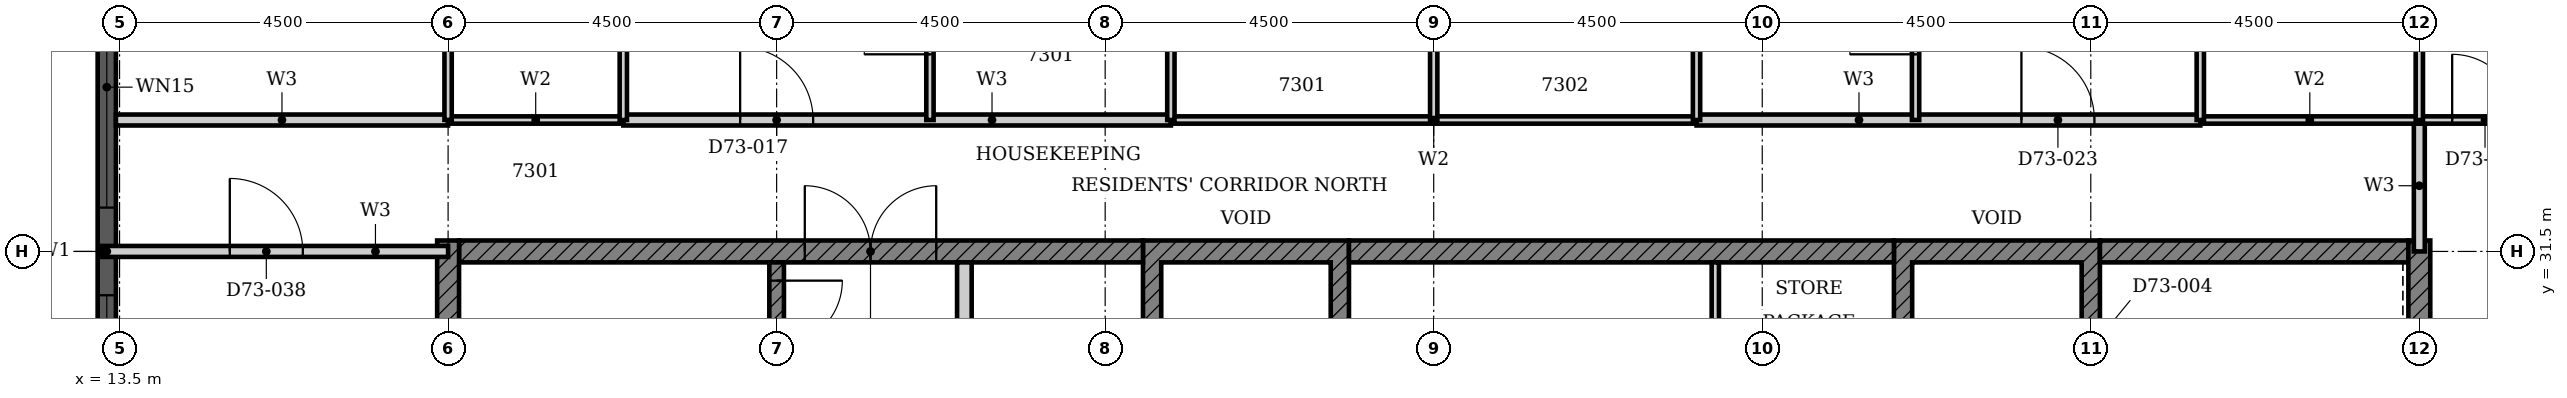
"""IFC4 building model, lengths in metres.
Left out: names, types, materials, properties, quantities, classifications, styles, units other than length and angle.
Written with IfcOpenShell. Run it as: python <this file> out.ifc"""

import sys

from ifc_helpers import new_model, si_unit, direction, frame, frame_2d, origin, place, context, subcontext, project, spatial, polyline, rectangle, outline, extrude, element, fill, save


model = new_model("IFC4")
c1 = context("Model", 3, precision=1e-05, world=origin(), true_north=direction((0.0, 1.0)))
c2 = subcontext(c1, "Body", "Model", "MODEL_VIEW")
j1 = project(units=[si_unit("LENGTHUNIT", "METRE"), si_unit("PLANEANGLEUNIT", "RADIAN")], contexts=[c1])
p1 = place(None, origin())
s1 = spatial("IfcSite", under=j1, at=p1, CompositionType="ELEMENT")
p2 = place(p1, origin())
s2 = spatial("IfcBuilding", under=s1, at=p2, CompositionType="ELEMENT")
p3 = place(p2, frame((0.0, 0.0, 287.1)))
s3 = spatial("IfcBuildingStorey", under=s2, at=p3, CompositionType="ELEMENT", Elevation=287.1)
p4 = place(p3, frame((13.325, 35.7, 0.0), z_axis=(0.0, 0.0, 1.0), x_axis=(0.0, -1.0, 0.0)))
e1 = element("IfcWall", 1, at=p4, inside=s3, PredefinedType="SOLIDWALL", context=c2, shape_type="SweptSolid", body=[
    extrude(rectangle(XDim=8.4, YDim=0.25, at=frame_2d((4.2, 0.0))), origin(), (0.0, 0.0, 1.0), 3.7),
])
p5 = place(p4, frame((0.3, 0.0, 0.45)))
e2 = element("IfcOpeningElement", 2, at=p5, cuts=e1, PredefinedType="OPENING", context=c2, shape_type="SweptSolid", body=[
    extrude(rectangle(XDim=3.3, YDim=2.3, at=frame_2d((1.65, 1.15))), frame((0.0, 0.135, 0.0), z_axis=(0.0, -1.0, 0.0), x_axis=(1.0, 0.0, 0.0)), (0.0, 0.0, 1.0), 0.27),
])
p6 = place(p4, frame((4.8, 0.0, 0.45)))
e3 = element("IfcOpeningElement", 3, at=p6, cuts=e1, PredefinedType="OPENING", context=c2, shape_type="SweptSolid", body=[
    extrude(rectangle(XDim=3.3, YDim=2.3, at=frame_2d((1.65, 1.15))), frame((0.0, 0.135, 0.0), z_axis=(0.0, -1.0, 0.0), x_axis=(1.0, 0.0, 0.0)), (0.0, 0.0, 1.0), 0.27),
])
p7 = place(p3, origin())
e4 = element("IfcWall", 4, at=p7, inside=s3, PredefinedType="SHEAR", context=c2, shape_type="SweptSolid", body=[
    extrude(outline(polyline([(27.518, 28.725), (27.768, 28.725), (27.768, 31.35), (30.089, 31.35), (30.089, 28.725), (30.339, 28.725), (30.339, 31.65), (27.518, 31.65), (27.518, 28.725)])), origin(), (0.0, 0.0, 1.0), 3.4),
])
p8 = place(p3, origin())
e5 = element("IfcWall", 5, at=p8, inside=s3, PredefinedType="SHEAR", context=c2, shape_type="SweptSolid", body=[
    extrude(outline(polyline([(37.803, 28.725), (38.053, 28.725), (38.053, 31.35), (40.375, 31.35), (40.375, 28.725), (40.625, 28.725), (40.625, 31.65), (37.803, 31.65), (37.803, 28.725)])), origin(), (0.0, 0.0, 1.0), 3.4),
])
p9 = place(p3, frame((18.15, 31.5, 0.0), z_axis=(0.0, 0.0, 1.0), x_axis=(1.0, 0.0, 0.0)))
e6 = element("IfcWall", 6, at=p9, inside=s3, PredefinedType="SHEAR", context=c2, shape_type="SweptSolid", body=[
    extrude(rectangle(XDim=9.368, YDim=0.3, at=frame_2d((4.684, 0.0))), origin(), (0.0, 0.0, 1.0), 3.4),
])
p10 = place(p9, frame((4.736, 0.0, 0.0)))
e7 = element("IfcOpeningElement", 7, at=p10, cuts=e6, PredefinedType="OPENING", context=c2, shape_type="SweptSolid", body=[
    extrude(rectangle(XDim=1.8, YDim=2.1, at=frame_2d((0.9, 1.05))), frame((0.0, 0.16, 0.0), z_axis=(0.0, -1.0, 0.0), x_axis=(1.0, 0.0, 0.0)), (0.0, 0.0, 1.0), 0.32),
])
p11 = place(p3, frame((30.339, 31.5, 0.0), z_axis=(0.0, 0.0, 1.0), x_axis=(1.0, 0.0, 0.0)))
e8 = element("IfcWall", 8, at=p11, inside=s3, PredefinedType="SHEAR", context=c2, shape_type="SweptSolid", body=[
    extrude(rectangle(XDim=7.464, YDim=0.3, at=frame_2d((3.732, 0.0))), origin(), (0.0, 0.0, 1.0), 3.4),
])
p12 = place(p3, frame((40.625, 31.5, 0.0), z_axis=(0.0, 0.0, 1.0), x_axis=(1.0, 0.0, 0.0)))
e9 = element("IfcWall", 9, at=p12, inside=s3, PredefinedType="SHEAR", context=c2, shape_type="SweptSolid", body=[
    extrude(rectangle(XDim=4.225, YDim=0.3, at=frame_2d((2.113, 0.0))), origin(), (0.0, 0.0, 1.0), 3.4),
])
for number, where, z_axis, x_axis in (
    (10, (18.0, 22.35, 0.0), (0.0, 0.0, 1.0), (0.0, 1.0, 0.0)),
    (11, (45.0, 22.35, 0.0), (0.0, 0.0, 1.0), (0.0, 1.0, 0.0)),
):
    element("IfcWall", number, at=place(p3, frame(where, z_axis=z_axis, x_axis=x_axis)), inside=s3, PredefinedType="SHEAR", context=c2, shape_type="SweptSolid", body=[
        extrude(rectangle(XDim=9.3, YDim=0.3, at=frame_2d((4.65, 0.0))), origin(), (0.0, 0.0, 1.0), 3.4),
    ])
p13 = place(p3, frame((25.072, 28.725, 0.0), z_axis=(0.0, 0.0, 1.0), x_axis=(0.0, 1.0, 0.0)))
e12 = element("IfcWall", 12, at=p13, inside=s3, PredefinedType="PARTITIONING", context=c2, shape_type="SweptSolid", body=[
    extrude(rectangle(XDim=2.625, YDim=0.2, at=frame_2d((1.312, 0.0))), origin(), (0.0, 0.0, 1.0), 3.4),
])
p14 = place(p3, frame((35.357, 28.725, 0.0), z_axis=(0.0, 0.0, 1.0), x_axis=(0.0, 1.0, 0.0)))
e13 = element("IfcWall", 13, at=p14, inside=s3, PredefinedType="PARTITIONING", context=c2, shape_type="SweptSolid", body=[
    extrude(rectangle(XDim=2.625, YDim=0.1, at=frame_2d((1.312, 0.0))), origin(), (0.0, 0.0, 1.0), 3.4),
])
p15 = place(p3, frame((22.5, 31.35, 0.0), z_axis=(0.0, 0.0, 1.0), x_axis=(0.0, -1.0, 0.0)))
e14 = element("IfcWall", 14, at=p15, inside=s3, PredefinedType="SHEAR", context=c2, shape_type="SweptSolid", body=[
    extrude(rectangle(XDim=5.825, YDim=0.2, at=frame_2d((2.913, 0.0))), origin(), (0.0, 0.0, 1.0), 3.4),
])
p16 = place(p15, frame((0.25, 0.0, 0.0)))
e15 = element("IfcOpeningElement", 15, at=p16, cuts=e14, PredefinedType="OPENING", context=c2, shape_type="SweptSolid", body=[
    extrude(rectangle(XDim=1.8, YDim=2.1, at=frame_2d((0.9, 1.05))), frame((0.0, 0.11, 0.0), z_axis=(0.0, -1.0, 0.0), x_axis=(1.0, 0.0, 0.0)), (0.0, 0.0, 1.0), 0.22),
])
p17 = place(p3, frame((13.26, 31.5, 0.0), z_axis=(0.0, 0.0, 1.0), x_axis=(1.0, 0.0, 0.0)))
e16 = element("IfcWall", 16, at=p17, inside=s3, PredefinedType="PARTITIONING", context=c2, shape_type="SweptSolid", body=[
    extrude(rectangle(XDim=4.74, YDim=0.15, at=frame_2d((2.37, 0.0))), origin(), (0.0, 0.0, 1.0), 3.4),
])
p18 = place(p17, frame((1.75, 0.0, 0.0)))
e17 = element("IfcOpeningElement", 17, at=p18, cuts=e16, PredefinedType="OPENING", context=c2, shape_type="SweptSolid", body=[
    extrude(rectangle(XDim=1.0, YDim=2.2, at=frame_2d((0.5, 1.1))), frame((0.0, 0.085, 0.0), z_axis=(0.0, -1.0, 0.0), x_axis=(1.0, 0.0, 0.0)), (0.0, 0.0, 1.0), 0.17),
])
p19 = place(p3, frame((13.45, 33.3, 0.0), z_axis=(0.0, 0.0, 1.0), x_axis=(1.0, 0.0, 0.0)))
e18 = element("IfcWall", 18, at=p19, inside=s3, PredefinedType="PARTITIONING", context=c2, shape_type="SweptSolid", body=[
    extrude(rectangle(XDim=4.549, YDim=0.15, at=frame_2d((2.274, 0.0))), origin(), (0.0, 0.0, 1.0), 3.4),
])
p20 = place(p3, frame((20.4, 33.3, 0.0), z_axis=(0.0, 0.0, 1.0), x_axis=(1.0, 0.0, 0.0)))
e19 = element("IfcWall", 19, at=p20, inside=s3, PredefinedType="PARTITIONING", context=c2, shape_type="SweptSolid", body=[
    extrude(rectangle(XDim=7.5, YDim=0.15, at=frame_2d((3.75, 0.0))), origin(), (0.0, 0.0, 1.0), 3.4),
])
p21 = place(p20, frame((1.6, 0.0, 0.0)))
e20 = element("IfcOpeningElement", 20, at=p21, cuts=e19, PredefinedType="OPENING", context=c2, shape_type="SweptSolid", body=[
    extrude(rectangle(XDim=1.0, YDim=2.2, at=frame_2d((0.5, 1.1))), frame((0.0, 0.085, 0.0), z_axis=(0.0, -1.0, 0.0), x_axis=(1.0, 0.0, 0.0)), (0.0, 0.0, 1.0), 0.17),
])
p22 = place(p3, frame((35.1, 33.3, 0.0), z_axis=(0.0, 0.0, 1.0), x_axis=(1.0, 0.0, 0.0)))
e21 = element("IfcWall", 21, at=p22, inside=s3, PredefinedType="PARTITIONING", context=c2, shape_type="SweptSolid", body=[
    extrude(rectangle(XDim=6.9, YDim=0.15, at=frame_2d((3.45, 0.0))), origin(), (0.0, 0.0, 1.0), 3.4),
])
p23 = place(p22, frame((4.45, 0.0, 0.0)))
e22 = element("IfcOpeningElement", 22, at=p23, cuts=e21, PredefinedType="OPENING", context=c2, shape_type="SweptSolid", body=[
    extrude(rectangle(XDim=1.0, YDim=2.2, at=frame_2d((0.5, 1.1))), frame((0.0, 0.085, 0.0), z_axis=(0.0, -1.0, 0.0), x_axis=(1.0, 0.0, 0.0)), (0.0, 0.0, 1.0), 0.17),
])
p24 = place(p3, frame((45.0, 31.5, 0.0), z_axis=(0.0, 0.0, 1.0), x_axis=(0.0, 1.0, 0.0)))
e23 = element("IfcWall", 23, at=p24, inside=s3, PredefinedType="PARTITIONING", context=c2, shape_type="SweptSolid", body=[
    extrude(rectangle(XDim=1.8, YDim=0.15, at=frame_2d((0.9, 0.0))), origin(), (0.0, 0.0, 1.0), 3.4),
])
p25 = place(p3, frame((45.0, 33.3, 0.0), z_axis=(0.0, 0.0, 1.0), x_axis=(1.0, 0.0, 0.0)))
e24 = element("IfcWall", 24, at=p25, inside=s3, PredefinedType="PARTITIONING", context=c2, shape_type="SweptSolid", body=[
    extrude(rectangle(XDim=1.8, YDim=0.1, at=frame_2d((0.9, 0.0))), origin(), (0.0, 0.0, 1.0), 3.4),
])
p26 = place(p25, frame((0.45, 0.0, 0.0)))
e25 = element("IfcOpeningElement", 25, at=p26, cuts=e24, PredefinedType="OPENING", context=c2, shape_type="SweptSolid", body=[
    extrude(rectangle(XDim=0.9, YDim=2.1, at=frame_2d((0.45, 1.05))), frame((0.0, 0.06, 0.0), z_axis=(0.0, -1.0, 0.0), x_axis=(1.0, 0.0, 0.0)), (0.0, 0.0, 1.0), 0.12),
])
p27 = place(p3, frame((24.6, 33.3, 0.0), z_axis=(0.0, 0.0, 1.0), x_axis=(0.0, 1.0, 0.0)))
e26 = element("IfcWall", 26, at=p27, inside=s3, PredefinedType="PARTITIONING", context=c2, shape_type="SweptSolid", body=[
    extrude(rectangle(XDim=2.7, YDim=0.1, at=frame_2d((1.35, 0.0))), origin(), (0.0, 0.0, 1.0), 3.4),
])
p28 = place(p27, frame((0.9, 0.0, 0.0)))
e27 = element("IfcOpeningElement", 27, at=p28, cuts=e26, PredefinedType="OPENING", context=c2, shape_type="SweptSolid", body=[
    extrude(rectangle(XDim=0.9, YDim=2.1, at=frame_2d((0.45, 1.05))), frame((0.0, 0.06, 0.0), z_axis=(0.0, -1.0, 0.0), x_axis=(1.0, 0.0, 0.0)), (0.0, 0.0, 1.0), 0.12),
])
p29 = place(p3, frame((38.1, 33.3, 0.0), z_axis=(0.0, 0.0, 1.0), x_axis=(0.0, 1.0, 0.0)))
e28 = element("IfcWall", 28, at=p29, inside=s3, PredefinedType="PARTITIONING", context=c2, shape_type="SweptSolid", body=[
    extrude(rectangle(XDim=2.7, YDim=0.1, at=frame_2d((1.35, 0.0))), origin(), (0.0, 0.0, 1.0), 3.4),
])
p30 = place(p29, frame((0.9, 0.0, 0.0)))
e29 = element("IfcOpeningElement", 29, at=p30, cuts=e28, PredefinedType="OPENING", context=c2, shape_type="SweptSolid", body=[
    extrude(rectangle(XDim=0.9, YDim=2.1, at=frame_2d((0.45, 1.05))), frame((0.0, 0.06, 0.0), z_axis=(0.0, -1.0, 0.0), x_axis=(1.0, 0.0, 0.0)), (0.0, 0.0, 1.0), 0.12),
])
p31 = place(p3, frame((18.0, 33.3, 0.0), z_axis=(0.0, 0.0, 1.0), x_axis=(1.0, 0.0, 0.0)))
e30 = element("IfcWall", 30, at=p31, inside=s3, PredefinedType="PARTITIONING", context=c2, shape_type="SweptSolid", body=[
    extrude(rectangle(XDim=2.4, YDim=0.1, at=frame_2d((1.2, 0.0))), origin(), (0.0, 0.0, 1.0), 3.4),
])
p32 = place(p3, frame((27.9, 33.3, 0.0), z_axis=(0.0, 0.0, 1.0), x_axis=(1.0, 0.0, 0.0)))
e31 = element("IfcWall", 31, at=p32, inside=s3, PredefinedType="PARTITIONING", context=c2, shape_type="SweptSolid", body=[
    extrude(rectangle(XDim=7.2, YDim=0.1, at=frame_2d((3.6, 0.0))), origin(), (0.0, 0.0, 1.0), 3.4),
])
p33 = place(p3, frame((42.0, 33.3, 0.0), z_axis=(0.0, 0.0, 1.0), x_axis=(1.0, 0.0, 0.0)))
e32 = element("IfcWall", 32, at=p33, inside=s3, PredefinedType="PARTITIONING", context=c2, shape_type="SweptSolid", body=[
    extrude(rectangle(XDim=3.0, YDim=0.1, at=frame_2d((1.5, 0.0))), origin(), (0.0, 0.0, 1.0), 3.4),
])
p34 = place(p3, frame((18.0, 33.301, 0.0), z_axis=(0.0, 0.0, 1.0), x_axis=(0.0, 1.0, 0.0)))
e33 = element("IfcWall", 33, at=p34, inside=s3, PredefinedType="PARTITIONING", context=c2, shape_type="SweptSolid", body=[
    extrude(rectangle(XDim=2.699, YDim=0.1, at=frame_2d((1.35, 0.0))), origin(), (0.0, 0.0, 1.0), 3.4),
])
p35 = place(p3, frame((20.4, 33.3, 0.0), z_axis=(0.0, 0.0, 1.0), x_axis=(0.0, 1.0, 0.0)))
e34 = element("IfcWall", 34, at=p35, inside=s3, PredefinedType="PARTITIONING", context=c2, shape_type="SweptSolid", body=[
    extrude(rectangle(XDim=2.7, YDim=0.1, at=frame_2d((1.35, 0.0))), origin(), (0.0, 0.0, 1.0), 3.4),
])
p36 = place(p35, frame((0.95, 0.0, 0.0)))
e35 = element("IfcOpeningElement", 35, at=p36, cuts=e34, PredefinedType="OPENING", context=c2, shape_type="SweptSolid", body=[
    extrude(rectangle(XDim=0.8, YDim=2.1, at=frame_2d((0.4, 1.05))), frame((0.0, 0.06, 0.0), z_axis=(0.0, -1.0, 0.0), x_axis=(1.0, 0.0, 0.0)), (0.0, 0.0, 1.0), 0.12),
])
for number, where, z_axis, x_axis in (
    (36, (27.9, 33.3, 0.0), (0.0, 0.0, 1.0), (0.0, 1.0, 0.0)),
    (37, (31.5, 33.3, 0.0), (0.0, 0.0, 1.0), (0.0, 1.0, 0.0)),
    (38, (35.1, 33.3, 0.0), (0.0, 0.0, 1.0), (0.0, 1.0, 0.0)),
):
    element("IfcWall", number, at=place(p3, frame(where, z_axis=z_axis, x_axis=x_axis)), inside=s3, PredefinedType="PARTITIONING", context=c2, shape_type="SweptSolid", body=[
        extrude(rectangle(XDim=2.7, YDim=0.1, at=frame_2d((1.35, 0.0))), origin(), (0.0, 0.0, 1.0), 3.4),
    ])
p37 = place(p3, frame((42.0, 33.3, 0.0), z_axis=(0.0, 0.0, 1.0), x_axis=(0.0, 1.0, 0.0)))
e39 = element("IfcWall", 39, at=p37, inside=s3, PredefinedType="PARTITIONING", context=c2, shape_type="SweptSolid", body=[
    extrude(rectangle(XDim=2.7, YDim=0.1, at=frame_2d((1.35, 0.0))), origin(), (0.0, 0.0, 1.0), 3.4),
])
p38 = place(p37, frame((0.95, 0.0, 0.0)))
e40 = element("IfcOpeningElement", 40, at=p38, cuts=e39, PredefinedType="OPENING", context=c2, shape_type="SweptSolid", body=[
    extrude(rectangle(XDim=0.8, YDim=2.1, at=frame_2d((0.4, 1.05))), frame((0.0, 0.06, 0.0), z_axis=(0.0, -1.0, 0.0), x_axis=(1.0, 0.0, 0.0)), (0.0, 0.0, 1.0), 0.12),
])
p39 = place(p3, frame((45.0, 33.3, 0.0), z_axis=(0.0, 0.0, 1.0), x_axis=(0.0, 1.0, 0.0)))
e41 = element("IfcWall", 41, at=p39, inside=s3, PredefinedType="PARTITIONING", context=c2, shape_type="SweptSolid", body=[
    extrude(rectangle(XDim=2.7, YDim=0.1, at=frame_2d((1.35, 0.0))), origin(), (0.0, 0.0, 1.0), 3.4),
])
p40 = place(p5, origin())
e42 = element("IfcWindow", 42, at=p40, inside=s3, PartitioningType="SINGLE_PANEL", PredefinedType="WINDOW", context=c2, shape_type="SweptSolid", body=[
    extrude(rectangle(XDim=3.3, YDim=2.3, at=frame_2d((1.65, 1.15))), frame((0.0, 0.03, 0.0), z_axis=(0.0, -1.0, 0.0), x_axis=(1.0, 0.0, 0.0)), (0.0, 0.0, 1.0), 0.06),
])
fill(e2, e42)
p41 = place(p6, origin())
e43 = element("IfcWindow", 43, at=p41, inside=s3, PartitioningType="SINGLE_PANEL", PredefinedType="WINDOW", context=c2, shape_type="SweptSolid", body=[
    extrude(rectangle(XDim=3.3, YDim=2.3, at=frame_2d((1.65, 1.15))), frame((0.0, 0.03, 0.0), z_axis=(0.0, -1.0, 0.0), x_axis=(1.0, 0.0, 0.0)), (0.0, 0.0, 1.0), 0.06),
])
fill(e3, e43)
p42 = place(p16, origin())
e44 = element("IfcDoor", 44, at=p42, inside=s3, OperationType="DOUBLE_DOOR_SINGLE_SWING", PredefinedType="DOOR", context=c2, shape_type="SweptSolid", body=[
    extrude(rectangle(XDim=1.8, YDim=2.1, at=frame_2d((0.9, 1.05))), frame((0.0, 0.025, 0.0), z_axis=(0.0, -1.0, 0.0), x_axis=(1.0, 0.0, 0.0)), (0.0, 0.0, 1.0), 0.05),
])
fill(e15, e44)
p43 = place(p10, origin())
e45 = element("IfcDoor", 45, at=p43, inside=s3, OperationType="DOUBLE_DOOR_SINGLE_SWING", PredefinedType="DOOR", context=c2, shape_type="SweptSolid", body=[
    extrude(rectangle(XDim=1.8, YDim=2.1, at=frame_2d((0.9, 1.05))), frame((0.0, 0.025, 0.0), z_axis=(0.0, -1.0, 0.0), x_axis=(1.0, 0.0, 0.0)), (0.0, 0.0, 1.0), 0.05),
])
fill(e7, e45)
p44 = place(p21, origin())
e46 = element("IfcDoor", 46, at=p44, inside=s3, OperationType="SINGLE_SWING_RIGHT", PredefinedType="DOOR", context=c2, shape_type="SweptSolid", body=[
    extrude(rectangle(XDim=1.0, YDim=2.2, at=frame_2d((0.5, 1.1))), frame((0.0, 0.025, 0.0), z_axis=(0.0, -1.0, 0.0), x_axis=(1.0, 0.0, 0.0)), (0.0, 0.0, 1.0), 0.05),
])
fill(e20, e46)
p45 = place(p28, origin())
e47 = element("IfcDoor", 47, at=p45, inside=s3, OperationType="SINGLE_SWING_LEFT", PredefinedType="DOOR", context=c2, shape_type="SweptSolid", body=[
    extrude(rectangle(XDim=0.9, YDim=2.1, at=frame_2d((0.45, 1.05))), frame((0.0, 0.025, 0.0), z_axis=(0.0, -1.0, 0.0), x_axis=(1.0, 0.0, 0.0)), (0.0, 0.0, 1.0), 0.05),
])
fill(e27, e47)
p46 = place(p23, origin())
e48 = element("IfcDoor", 48, at=p46, inside=s3, OperationType="SINGLE_SWING_LEFT", PredefinedType="DOOR", context=c2, shape_type="SweptSolid", body=[
    extrude(rectangle(XDim=1.0, YDim=2.2, at=frame_2d((0.5, 1.1))), frame((0.0, 0.025, 0.0), z_axis=(0.0, -1.0, 0.0), x_axis=(1.0, 0.0, 0.0)), (0.0, 0.0, 1.0), 0.05),
])
fill(e22, e48)
p47 = place(p30, origin())
e49 = element("IfcDoor", 49, at=p47, inside=s3, OperationType="SINGLE_SWING_LEFT", PredefinedType="DOOR", context=c2, shape_type="SweptSolid", body=[
    extrude(rectangle(XDim=0.9, YDim=2.1, at=frame_2d((0.45, 1.05))), frame((0.0, 0.025, 0.0), z_axis=(0.0, -1.0, 0.0), x_axis=(1.0, 0.0, 0.0)), (0.0, 0.0, 1.0), 0.05),
])
fill(e29, e49)
p48 = place(p18, origin())
e50 = element("IfcDoor", 50, at=p48, inside=s3, OperationType="SINGLE_SWING_RIGHT", PredefinedType="DOOR", context=c2, shape_type="SweptSolid", body=[
    extrude(rectangle(XDim=1.0, YDim=2.2, at=frame_2d((0.5, 1.1))), frame((0.0, 0.025, 0.0), z_axis=(0.0, -1.0, 0.0), x_axis=(1.0, 0.0, 0.0)), (0.0, 0.0, 1.0), 0.05),
])
fill(e17, e50)
p49 = place(p26, origin())
e51 = element("IfcDoor", 51, at=p49, inside=s3, OperationType="SINGLE_SWING_RIGHT", PredefinedType="DOOR", context=c2, shape_type="SweptSolid", body=[
    extrude(rectangle(XDim=0.9, YDim=2.1, at=frame_2d((0.45, 1.05))), frame((0.0, 0.025, 0.0), z_axis=(0.0, -1.0, 0.0), x_axis=(1.0, 0.0, 0.0)), (0.0, 0.0, 1.0), 0.05),
])
fill(e25, e51)
save(model, sys.argv[1])
